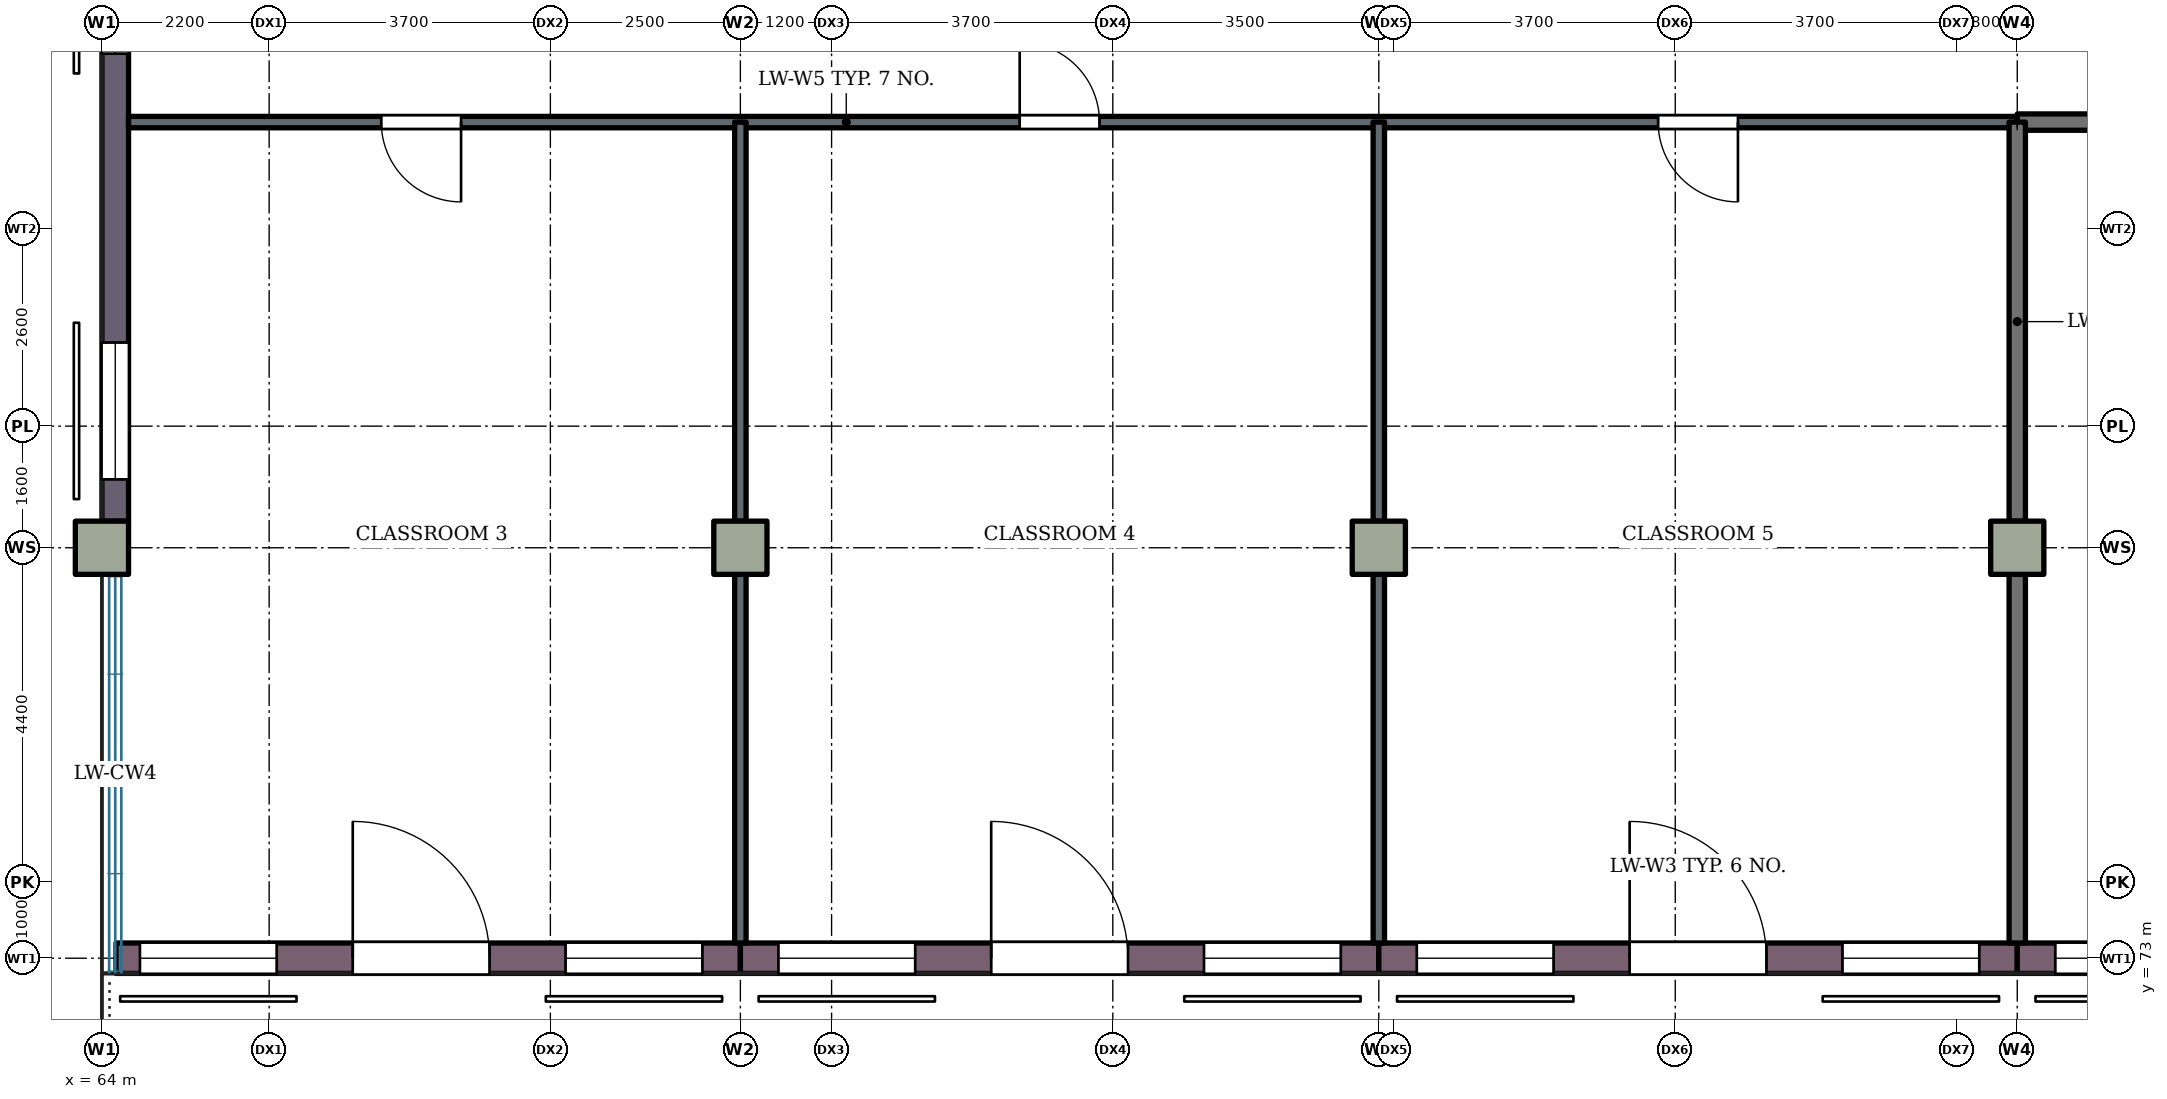
"""IFC4 building model, lengths in metres.
Left out: names, types, materials, properties, quantities, classifications, styles, units other than length and angle.
Written with IfcOpenShell. Run it as: python <this file> out.ifc"""

import sys

from ifc_helpers import new_model, si_unit, direction, frame, frame_2d, origin, origin_2d, place, context, subcontext, project, spatial, rectangle, extrude, element, fill, save


model = new_model("IFC4")
c1 = context("Model", 3, precision=1e-05, world=origin(), true_north=direction((0.0, 1.0)))
c2 = subcontext(c1, "Body", "Model", "MODEL_VIEW")
j1 = project(units=[si_unit("LENGTHUNIT", "METRE"), si_unit("PLANEANGLEUNIT", "RADIAN")], contexts=[c1])
p1 = place(None, origin())
s1 = spatial("IfcSite", under=j1, at=p1, CompositionType="ELEMENT")
p2 = place(p1, origin())
s2 = spatial("IfcBuilding", under=s1, at=p2, CompositionType="ELEMENT")
p3 = place(p2, frame((0.0, 0.0, 4.2)))
s3 = spatial("IfcBuildingStorey", under=s2, at=p3, CompositionType="ELEMENT", Elevation=4.2)
for number, where, z_axis, x_axis in (
    (1, (64.0, 78.4, 0.0), (0.0, 0.0, 1.0), (1.0, 0.0, 0.0)),
    (2, (72.4, 78.4, 0.0), (0.0, 0.0, 1.0), (1.0, 0.0, 0.0)),
    (3, (80.8, 78.4, 0.0), (0.0, 0.0, 1.0), (1.0, 0.0, 0.0)),
    (4, (89.2, 78.4, 0.0), (0.0, 0.0, 1.0), (1.0, 0.0, 0.0)),
):
    element("IfcColumn", number, at=place(p3, frame(where, z_axis=z_axis, x_axis=x_axis)), inside=s3, PredefinedType="COLUMN", context=c2, shape_type="SweptSolid", body=[
        extrude(rectangle(XDim=0.7, YDim=0.7, at=origin_2d()), origin(), (0.0, 0.0, 1.0), 4.2),
    ])
p4 = place(p3, frame((64.175, 78.75, 0.0), z_axis=(0.0, 0.0, 1.0), x_axis=(0.0, 1.0, 0.0)))
e5 = element("IfcWall", 5, at=p4, inside=s3, PredefinedType="SHEAR", context=c2, shape_type="SweptSolid", body=[
    extrude(rectangle(XDim=8.5, YDim=0.35, at=frame_2d((4.25, 0.0))), origin(), (0.0, 0.0, 1.0), 4.2),
])
p5 = place(p4, frame((0.55, 0.0, 0.9)))
e6 = element("IfcOpeningElement", 6, at=p5, cuts=e5, PredefinedType="OPENING", context=c2, shape_type="SweptSolid", body=[
    extrude(rectangle(XDim=1.8, YDim=2.1, at=frame_2d((0.9, 1.05))), frame((0.0, 0.185, 0.0), z_axis=(0.0, -1.0, 0.0), x_axis=(1.0, 0.0, 0.0)), (0.0, 0.0, 1.0), 0.37),
])
p6 = place(p4, frame((6.15, 0.0, 0.9)))
e7 = element("IfcOpeningElement", 7, at=p6, cuts=e5, PredefinedType="OPENING", context=c2, shape_type="SweptSolid", body=[
    extrude(rectangle(XDim=1.8, YDim=2.1, at=frame_2d((0.9, 1.05))), frame((0.0, 0.185, 0.0), z_axis=(0.0, -1.0, 0.0), x_axis=(1.0, 0.0, 0.0)), (0.0, 0.0, 1.0), 0.37),
])
p7 = place(p3, frame((64.185, 73.0, 0.0), z_axis=(0.0, 0.0, 1.0), x_axis=(1.0, 0.0, 0.0)))
e8 = element("IfcWall", 8, at=p7, inside=s3, PredefinedType="SOLIDWALL", context=c2, shape_type="SweptSolid", body=[
    extrude(rectangle(XDim=8.215, YDim=0.4, at=frame_2d((4.107, 0.0))), origin(), (0.0, 0.0, 1.0), 3.32),
])
p8 = place(p7, frame((3.115, 0.0, 0.0)))
e9 = element("IfcOpeningElement", 9, at=p8, cuts=e8, PredefinedType="OPENING", context=c2, shape_type="SweptSolid", body=[
    extrude(rectangle(XDim=1.8, YDim=2.4, at=frame_2d((0.9, 1.2))), frame((0.0, 0.21, 0.0), z_axis=(0.0, -1.0, 0.0), x_axis=(1.0, 0.0, 0.0)), (0.0, 0.0, 1.0), 0.42),
])
p9 = place(p7, frame((0.315, 0.0, 0.9)))
e10 = element("IfcOpeningElement", 10, at=p9, cuts=e8, PredefinedType="OPENING", context=c2, shape_type="SweptSolid", body=[
    extrude(rectangle(XDim=1.8, YDim=1.9, at=frame_2d((0.9, 0.95))), frame((0.0, 0.21, 0.0), z_axis=(0.0, -1.0, 0.0), x_axis=(1.0, 0.0, 0.0)), (0.0, 0.0, 1.0), 0.42),
])
p10 = place(p7, frame((5.915, 0.0, 0.9)))
e11 = element("IfcOpeningElement", 11, at=p10, cuts=e8, PredefinedType="OPENING", context=c2, shape_type="SweptSolid", body=[
    extrude(rectangle(XDim=1.8, YDim=1.9, at=frame_2d((0.9, 0.95))), frame((0.0, 0.21, 0.0), z_axis=(0.0, -1.0, 0.0), x_axis=(1.0, 0.0, 0.0)), (0.0, 0.0, 1.0), 0.42),
])
p11 = place(p3, frame((72.4, 73.0, 0.0), z_axis=(0.0, 0.0, 1.0), x_axis=(1.0, 0.0, 0.0)))
e12 = element("IfcWall", 12, at=p11, inside=s3, PredefinedType="SOLIDWALL", context=c2, shape_type="SweptSolid", body=[
    extrude(rectangle(XDim=8.4, YDim=0.4, at=frame_2d((4.2, 0.0))), origin(), (0.0, 0.0, 1.0), 3.32),
])
p12 = place(p11, frame((3.3, 0.0, 0.0)))
e13 = element("IfcOpeningElement", 13, at=p12, cuts=e12, PredefinedType="OPENING", context=c2, shape_type="SweptSolid", body=[
    extrude(rectangle(XDim=1.8, YDim=2.4, at=frame_2d((0.9, 1.2))), frame((0.0, 0.21, 0.0), z_axis=(0.0, -1.0, 0.0), x_axis=(1.0, 0.0, 0.0)), (0.0, 0.0, 1.0), 0.42),
])
p13 = place(p11, frame((0.5, 0.0, 0.9)))
e14 = element("IfcOpeningElement", 14, at=p13, cuts=e12, PredefinedType="OPENING", context=c2, shape_type="SweptSolid", body=[
    extrude(rectangle(XDim=1.8, YDim=1.9, at=frame_2d((0.9, 0.95))), frame((0.0, 0.21, 0.0), z_axis=(0.0, -1.0, 0.0), x_axis=(1.0, 0.0, 0.0)), (0.0, 0.0, 1.0), 0.42),
])
p14 = place(p11, frame((6.1, 0.0, 0.9)))
e15 = element("IfcOpeningElement", 15, at=p14, cuts=e12, PredefinedType="OPENING", context=c2, shape_type="SweptSolid", body=[
    extrude(rectangle(XDim=1.8, YDim=1.9, at=frame_2d((0.9, 0.95))), frame((0.0, 0.21, 0.0), z_axis=(0.0, -1.0, 0.0), x_axis=(1.0, 0.0, 0.0)), (0.0, 0.0, 1.0), 0.42),
])
p15 = place(p3, frame((80.8, 73.0, 0.0), z_axis=(0.0, 0.0, 1.0), x_axis=(1.0, 0.0, 0.0)))
e16 = element("IfcWall", 16, at=p15, inside=s3, PredefinedType="SOLIDWALL", context=c2, shape_type="SweptSolid", body=[
    extrude(rectangle(XDim=8.4, YDim=0.4, at=frame_2d((4.2, 0.0))), origin(), (0.0, 0.0, 1.0), 3.32),
])
p16 = place(p15, frame((3.3, 0.0, 0.0)))
e17 = element("IfcOpeningElement", 17, at=p16, cuts=e16, PredefinedType="OPENING", context=c2, shape_type="SweptSolid", body=[
    extrude(rectangle(XDim=1.8, YDim=2.4, at=frame_2d((0.9, 1.2))), frame((0.0, 0.21, 0.0), z_axis=(0.0, -1.0, 0.0), x_axis=(1.0, 0.0, 0.0)), (0.0, 0.0, 1.0), 0.42),
])
p17 = place(p15, frame((0.5, 0.0, 0.9)))
e18 = element("IfcOpeningElement", 18, at=p17, cuts=e16, PredefinedType="OPENING", context=c2, shape_type="SweptSolid", body=[
    extrude(rectangle(XDim=1.8, YDim=1.9, at=frame_2d((0.9, 0.95))), frame((0.0, 0.21, 0.0), z_axis=(0.0, -1.0, 0.0), x_axis=(1.0, 0.0, 0.0)), (0.0, 0.0, 1.0), 0.42),
])
p18 = place(p15, frame((6.1, 0.0, 0.9)))
e19 = element("IfcOpeningElement", 19, at=p18, cuts=e16, PredefinedType="OPENING", context=c2, shape_type="SweptSolid", body=[
    extrude(rectangle(XDim=1.8, YDim=1.9, at=frame_2d((0.9, 0.95))), frame((0.0, 0.21, 0.0), z_axis=(0.0, -1.0, 0.0), x_axis=(1.0, 0.0, 0.0)), (0.0, 0.0, 1.0), 0.42),
])
p19 = place(p3, frame((89.2, 73.0, 0.0), z_axis=(0.0, 0.0, 1.0), x_axis=(1.0, 0.0, 0.0)))
e20 = element("IfcWall", 20, at=p19, inside=s3, PredefinedType="SOLIDWALL", context=c2, shape_type="SweptSolid", body=[
    extrude(rectangle(XDim=8.4, YDim=0.4, at=frame_2d((4.2, 0.0))), origin(), (0.0, 0.0, 1.0), 3.32),
])
p20 = place(p19, frame((3.3, 0.0, 0.0)))
e21 = element("IfcOpeningElement", 21, at=p20, cuts=e20, PredefinedType="OPENING", context=c2, shape_type="SweptSolid", body=[
    extrude(rectangle(XDim=1.8, YDim=2.4, at=frame_2d((0.9, 1.2))), frame((0.0, 0.21, 0.0), z_axis=(0.0, -1.0, 0.0), x_axis=(1.0, 0.0, 0.0)), (0.0, 0.0, 1.0), 0.42),
])
p21 = place(p19, frame((0.5, 0.0, 0.9)))
e22 = element("IfcOpeningElement", 22, at=p21, cuts=e20, PredefinedType="OPENING", context=c2, shape_type="SweptSolid", body=[
    extrude(rectangle(XDim=1.8, YDim=1.9, at=frame_2d((0.9, 0.95))), frame((0.0, 0.21, 0.0), z_axis=(0.0, -1.0, 0.0), x_axis=(1.0, 0.0, 0.0)), (0.0, 0.0, 1.0), 0.42),
])
p22 = place(p19, frame((6.1, 0.0, 0.9)))
e23 = element("IfcOpeningElement", 23, at=p22, cuts=e20, PredefinedType="OPENING", context=c2, shape_type="SweptSolid", body=[
    extrude(rectangle(XDim=1.8, YDim=1.9, at=frame_2d((0.9, 0.95))), frame((0.0, 0.21, 0.0), z_axis=(0.0, -1.0, 0.0), x_axis=(1.0, 0.0, 0.0)), (0.0, 0.0, 1.0), 0.42),
])
p23 = place(p3, frame((89.2, 84.0, 0.0), z_axis=(0.0, 0.0, 1.0), x_axis=(1.0, 0.0, 0.0)))
e24 = element("IfcWall", 24, at=p23, inside=s3, PredefinedType="PARTITIONING", context=c2, shape_type="SweptSolid", body=[
    extrude(rectangle(XDim=42.0, YDim=0.215, at=frame_2d((21.0, 0.0))), origin(), (0.0, 0.0, 1.0), 3.92),
])
p24 = place(p23, frame((7.7, 0.0, 0.0)))
e25 = element("IfcOpeningElement", 25, at=p24, cuts=e24, PredefinedType="OPENING", context=c2, shape_type="SweptSolid", body=[
    extrude(rectangle(XDim=1.4, YDim=2.1, at=frame_2d((0.7, 1.05))), frame((0.0, 0.117, 0.0), z_axis=(0.0, -1.0, 0.0), x_axis=(1.0, 0.0, 0.0)), (0.0, 0.0, 1.0), 0.235),
])
p25 = place(p23, frame((20.475, 0.0, 0.0)))
e26 = element("IfcOpeningElement", 26, at=p25, cuts=e24, PredefinedType="OPENING", context=c2, shape_type="SweptSolid", body=[
    extrude(rectangle(XDim=1.05, YDim=2.1, at=frame_2d((0.525, 1.05))), frame((0.0, 0.117, 0.0), z_axis=(0.0, -1.0, 0.0), x_axis=(1.0, 0.0, 0.0)), (0.0, 0.0, 1.0), 0.235),
])
p26 = place(p23, frame((33.075, 0.0, 0.0)))
e27 = element("IfcOpeningElement", 27, at=p26, cuts=e24, PredefinedType="OPENING", context=c2, shape_type="SweptSolid", body=[
    extrude(rectangle(XDim=1.05, YDim=2.1, at=frame_2d((0.525, 1.05))), frame((0.0, 0.117, 0.0), z_axis=(0.0, -1.0, 0.0), x_axis=(1.0, 0.0, 0.0)), (0.0, 0.0, 1.0), 0.235),
])
p27 = place(p3, frame((64.35, 84.0, 0.0), z_axis=(0.0, 0.0, 1.0), x_axis=(1.0, 0.0, 0.0)))
e28 = element("IfcWall", 28, at=p27, inside=s3, PredefinedType="PARTITIONING", context=c2, shape_type="SweptSolid", body=[
    extrude(rectangle(XDim=24.85, YDim=0.15, at=frame_2d((12.425, 0.0))), origin(), (0.0, 0.0, 1.0), 3.92),
])
p28 = place(p27, frame((3.325, 0.0, 0.0)))
e29 = element("IfcOpeningElement", 29, at=p28, cuts=e28, PredefinedType="OPENING", context=c2, shape_type="SweptSolid", body=[
    extrude(rectangle(XDim=1.05, YDim=2.1, at=frame_2d((0.525, 1.05))), frame((0.0, 0.085, 0.0), z_axis=(0.0, -1.0, 0.0), x_axis=(1.0, 0.0, 0.0)), (0.0, 0.0, 1.0), 0.17),
])
p29 = place(p27, frame((11.725, 0.0, 0.0)))
e30 = element("IfcOpeningElement", 30, at=p29, cuts=e28, PredefinedType="OPENING", context=c2, shape_type="SweptSolid", body=[
    extrude(rectangle(XDim=1.05, YDim=2.1, at=frame_2d((0.525, 1.05))), frame((0.0, 0.085, 0.0), z_axis=(0.0, -1.0, 0.0), x_axis=(1.0, 0.0, 0.0)), (0.0, 0.0, 1.0), 0.17),
])
p30 = place(p27, frame((20.125, 0.0, 0.0)))
e31 = element("IfcOpeningElement", 31, at=p30, cuts=e28, PredefinedType="OPENING", context=c2, shape_type="SweptSolid", body=[
    extrude(rectangle(XDim=1.05, YDim=2.1, at=frame_2d((0.525, 1.05))), frame((0.0, 0.085, 0.0), z_axis=(0.0, -1.0, 0.0), x_axis=(1.0, 0.0, 0.0)), (0.0, 0.0, 1.0), 0.17),
])
p31 = place(p3, frame((72.4, 73.2, 0.0), z_axis=(0.0, 0.0, 1.0), x_axis=(0.0, 1.0, 0.0)))
e32 = element("IfcWall", 32, at=p31, inside=s3, PredefinedType="PARTITIONING", context=c2, shape_type="SweptSolid", body=[
    extrude(rectangle(XDim=4.85, YDim=0.15, at=frame_2d((2.425, 0.0))), origin(), (0.0, 0.0, 1.0), 3.02),
])
p32 = place(p3, frame((72.4, 78.75, 0.0), z_axis=(0.0, 0.0, 1.0), x_axis=(0.0, 1.0, 0.0)))
e33 = element("IfcWall", 33, at=p32, inside=s3, PredefinedType="PARTITIONING", context=c2, shape_type="SweptSolid", body=[
    extrude(rectangle(XDim=5.25, YDim=0.15, at=frame_2d((2.625, 0.0))), origin(), (0.0, 0.0, 1.0), 3.02),
])
p33 = place(p3, frame((80.8, 73.2, 0.0), z_axis=(0.0, 0.0, 1.0), x_axis=(0.0, 1.0, 0.0)))
e34 = element("IfcWall", 34, at=p33, inside=s3, PredefinedType="PARTITIONING", context=c2, shape_type="SweptSolid", body=[
    extrude(rectangle(XDim=4.85, YDim=0.15, at=frame_2d((2.425, 0.0))), origin(), (0.0, 0.0, 1.0), 3.02),
])
p34 = place(p3, frame((80.8, 78.75, 0.0), z_axis=(0.0, 0.0, 1.0), x_axis=(0.0, 1.0, 0.0)))
e35 = element("IfcWall", 35, at=p34, inside=s3, PredefinedType="PARTITIONING", context=c2, shape_type="SweptSolid", body=[
    extrude(rectangle(XDim=5.25, YDim=0.15, at=frame_2d((2.625, 0.0))), origin(), (0.0, 0.0, 1.0), 3.02),
])
p35 = place(p3, frame((89.2, 73.2, 0.0), z_axis=(0.0, 0.0, 1.0), x_axis=(0.0, 1.0, 0.0)))
e36 = element("IfcWall", 36, at=p35, inside=s3, PredefinedType="PARTITIONING", context=c2, shape_type="SweptSolid", body=[
    extrude(rectangle(XDim=4.85, YDim=0.215, at=frame_2d((2.425, 0.0))), origin(), (0.0, 0.0, 1.0), 3.02),
])
p36 = place(p3, frame((89.2, 78.75, 0.0), z_axis=(0.0, 0.0, 1.0), x_axis=(0.0, 1.0, 0.0)))
e37 = element("IfcWall", 37, at=p36, inside=s3, PredefinedType="PARTITIONING", context=c2, shape_type="SweptSolid", body=[
    extrude(rectangle(XDim=5.25, YDim=0.215, at=frame_2d((2.625, 0.0))), origin(), (0.0, 0.0, 1.0), 3.02),
])
p37 = place(p8, origin())
e38 = element("IfcDoor", 38, at=p37, inside=s3, OperationType="DOUBLE_DOOR_SINGLE_SWING", PredefinedType="DOOR", context=c2, shape_type="SweptSolid", body=[
    extrude(rectangle(XDim=1.8, YDim=2.4, at=frame_2d((0.9, 1.2))), frame((0.0, 0.025, 0.0), z_axis=(0.0, -1.0, 0.0), x_axis=(1.0, 0.0, 0.0)), (0.0, 0.0, 1.0), 0.05),
])
fill(e9, e38)
p38 = place(p9, origin())
e39 = element("IfcWindow", 39, at=p38, inside=s3, PartitioningType="SINGLE_PANEL", PredefinedType="WINDOW", context=c2, shape_type="SweptSolid", body=[
    extrude(rectangle(XDim=1.8, YDim=1.9, at=frame_2d((0.9, 0.95))), frame((0.0, 0.03, 0.0), z_axis=(0.0, -1.0, 0.0), x_axis=(1.0, 0.0, 0.0)), (0.0, 0.0, 1.0), 0.06),
])
fill(e10, e39)
p39 = place(p10, origin())
e40 = element("IfcWindow", 40, at=p39, inside=s3, PartitioningType="SINGLE_PANEL", PredefinedType="WINDOW", context=c2, shape_type="SweptSolid", body=[
    extrude(rectangle(XDim=1.8, YDim=1.9, at=frame_2d((0.9, 0.95))), frame((0.0, 0.03, 0.0), z_axis=(0.0, -1.0, 0.0), x_axis=(1.0, 0.0, 0.0)), (0.0, 0.0, 1.0), 0.06),
])
fill(e11, e40)
p40 = place(p12, origin())
e41 = element("IfcDoor", 41, at=p40, inside=s3, OperationType="DOUBLE_DOOR_SINGLE_SWING", PredefinedType="DOOR", context=c2, shape_type="SweptSolid", body=[
    extrude(rectangle(XDim=1.8, YDim=2.4, at=frame_2d((0.9, 1.2))), frame((0.0, 0.025, 0.0), z_axis=(0.0, -1.0, 0.0), x_axis=(1.0, 0.0, 0.0)), (0.0, 0.0, 1.0), 0.05),
])
fill(e13, e41)
p41 = place(p13, origin())
e42 = element("IfcWindow", 42, at=p41, inside=s3, PartitioningType="SINGLE_PANEL", PredefinedType="WINDOW", context=c2, shape_type="SweptSolid", body=[
    extrude(rectangle(XDim=1.8, YDim=1.9, at=frame_2d((0.9, 0.95))), frame((0.0, 0.03, 0.0), z_axis=(0.0, -1.0, 0.0), x_axis=(1.0, 0.0, 0.0)), (0.0, 0.0, 1.0), 0.06),
])
fill(e14, e42)
p42 = place(p14, origin())
e43 = element("IfcWindow", 43, at=p42, inside=s3, PartitioningType="SINGLE_PANEL", PredefinedType="WINDOW", context=c2, shape_type="SweptSolid", body=[
    extrude(rectangle(XDim=1.8, YDim=1.9, at=frame_2d((0.9, 0.95))), frame((0.0, 0.03, 0.0), z_axis=(0.0, -1.0, 0.0), x_axis=(1.0, 0.0, 0.0)), (0.0, 0.0, 1.0), 0.06),
])
fill(e15, e43)
p43 = place(p16, origin())
e44 = element("IfcDoor", 44, at=p43, inside=s3, OperationType="DOUBLE_DOOR_SINGLE_SWING", PredefinedType="DOOR", context=c2, shape_type="SweptSolid", body=[
    extrude(rectangle(XDim=1.8, YDim=2.4, at=frame_2d((0.9, 1.2))), frame((0.0, 0.025, 0.0), z_axis=(0.0, -1.0, 0.0), x_axis=(1.0, 0.0, 0.0)), (0.0, 0.0, 1.0), 0.05),
])
fill(e17, e44)
p44 = place(p17, origin())
e45 = element("IfcWindow", 45, at=p44, inside=s3, PartitioningType="SINGLE_PANEL", PredefinedType="WINDOW", context=c2, shape_type="SweptSolid", body=[
    extrude(rectangle(XDim=1.8, YDim=1.9, at=frame_2d((0.9, 0.95))), frame((0.0, 0.03, 0.0), z_axis=(0.0, -1.0, 0.0), x_axis=(1.0, 0.0, 0.0)), (0.0, 0.0, 1.0), 0.06),
])
fill(e18, e45)
p45 = place(p18, origin())
e46 = element("IfcWindow", 46, at=p45, inside=s3, PartitioningType="SINGLE_PANEL", PredefinedType="WINDOW", context=c2, shape_type="SweptSolid", body=[
    extrude(rectangle(XDim=1.8, YDim=1.9, at=frame_2d((0.9, 0.95))), frame((0.0, 0.03, 0.0), z_axis=(0.0, -1.0, 0.0), x_axis=(1.0, 0.0, 0.0)), (0.0, 0.0, 1.0), 0.06),
])
fill(e19, e46)
p46 = place(p21, origin())
e47 = element("IfcWindow", 47, at=p46, inside=s3, PartitioningType="SINGLE_PANEL", PredefinedType="WINDOW", context=c2, shape_type="SweptSolid", body=[
    extrude(rectangle(XDim=1.8, YDim=1.9, at=frame_2d((0.9, 0.95))), frame((0.0, 0.03, 0.0), z_axis=(0.0, -1.0, 0.0), x_axis=(1.0, 0.0, 0.0)), (0.0, 0.0, 1.0), 0.06),
])
fill(e22, e47)
p47 = place(p5, origin())
e48 = element("IfcWindow", 48, at=p47, inside=s3, PartitioningType="SINGLE_PANEL", PredefinedType="WINDOW", context=c2, shape_type="SweptSolid", body=[
    extrude(rectangle(XDim=1.8, YDim=2.1, at=frame_2d((0.9, 1.05))), frame((0.0, 0.03, 0.0), z_axis=(0.0, -1.0, 0.0), x_axis=(1.0, 0.0, 0.0)), (0.0, 0.0, 1.0), 0.06),
])
fill(e6, e48)
p48 = place(p6, origin())
e49 = element("IfcWindow", 49, at=p48, inside=s3, PartitioningType="SINGLE_PANEL", PredefinedType="WINDOW", context=c2, shape_type="SweptSolid", body=[
    extrude(rectangle(XDim=1.8, YDim=2.1, at=frame_2d((0.9, 1.05))), frame((0.0, 0.03, 0.0), z_axis=(0.0, -1.0, 0.0), x_axis=(1.0, 0.0, 0.0)), (0.0, 0.0, 1.0), 0.06),
])
fill(e7, e49)
p49 = place(p28, origin())
e50 = element("IfcDoor", 50, at=p49, inside=s3, OperationType="SINGLE_SWING_RIGHT", PredefinedType="DOOR", context=c2, shape_type="SweptSolid", body=[
    extrude(rectangle(XDim=1.05, YDim=2.1, at=frame_2d((0.525, 1.05))), frame((0.0, 0.025, 0.0), z_axis=(0.0, -1.0, 0.0), x_axis=(1.0, 0.0, 0.0)), (0.0, 0.0, 1.0), 0.05),
])
fill(e29, e50)
p50 = place(p29, origin())
e51 = element("IfcDoor", 51, at=p50, inside=s3, OperationType="SINGLE_SWING_LEFT", PredefinedType="DOOR", context=c2, shape_type="SweptSolid", body=[
    extrude(rectangle(XDim=1.05, YDim=2.1, at=frame_2d((0.525, 1.05))), frame((0.0, 0.025, 0.0), z_axis=(0.0, -1.0, 0.0), x_axis=(1.0, 0.0, 0.0)), (0.0, 0.0, 1.0), 0.05),
])
fill(e30, e51)
p51 = place(p30, origin())
e52 = element("IfcDoor", 52, at=p51, inside=s3, OperationType="SINGLE_SWING_RIGHT", PredefinedType="DOOR", context=c2, shape_type="SweptSolid", body=[
    extrude(rectangle(XDim=1.05, YDim=2.1, at=frame_2d((0.525, 1.05))), frame((0.0, 0.025, 0.0), z_axis=(0.0, -1.0, 0.0), x_axis=(1.0, 0.0, 0.0)), (0.0, 0.0, 1.0), 0.05),
])
fill(e31, e52)
save(model, sys.argv[1])
